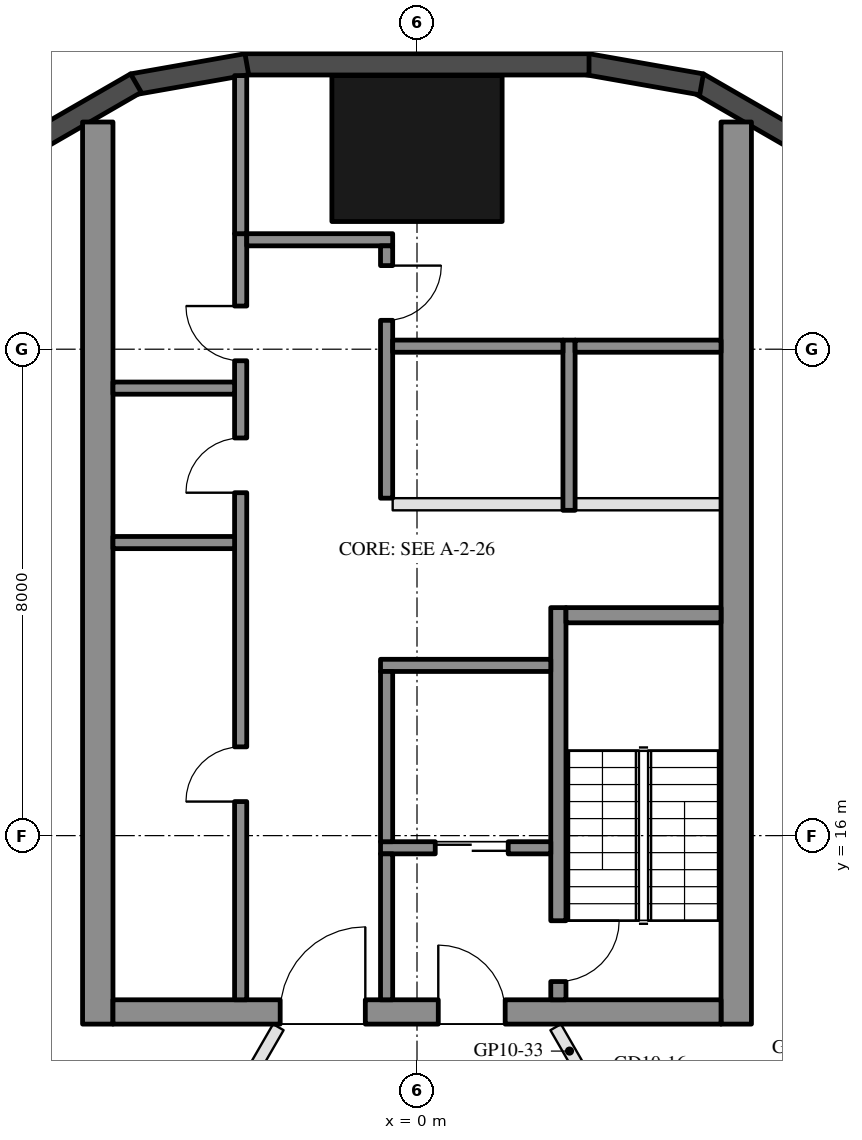
"""IFC4 building model, lengths in metres.
Left out: names, types, materials, properties, quantities, classifications, styles, units other than length and angle.
Written with IfcOpenShell. Run it as: python <this file> out.ifc"""

import sys

from ifc_helpers import new_model, si_unit, direction, frame, frame_2d, origin, origin_2d, place, context, subcontext, project, spatial, rectangle, hollow_rectangle, extrude, element, fill, save


model = new_model("IFC4")
c1 = context("Model", 3, precision=1e-05, world=origin(), true_north=direction((0.0, 1.0)))
c2 = subcontext(c1, "Body", "Model", "MODEL_VIEW")
j1 = project(units=[si_unit("LENGTHUNIT", "METRE"), si_unit("PLANEANGLEUNIT", "RADIAN")], contexts=[c1])
p1 = place(None, origin())
s1 = spatial("IfcSite", under=j1, at=p1, CompositionType="ELEMENT")
p2 = place(p1, origin())
s2 = spatial("IfcBuilding", under=s1, at=p2, CompositionType="ELEMENT")
p3 = place(p2, frame((0.0, 0.0, 116.8)))
s3 = spatial("IfcBuildingStorey", under=s2, at=p3, CompositionType="ELEMENT", Elevation=116.8)
p4 = place(p3, frame((0.0, 27.3, 0.0), z_axis=(0.0, 0.0, 1.0), x_axis=(1.0, 0.0, 0.0)))
e1 = element("IfcColumn", 1, at=p4, inside=s3, PredefinedType="COLUMN", context=c2, shape_type="SweptSolid", body=[
    extrude(hollow_rectangle(XDim=2.8, YDim=2.4, WallThickness=0.07, at=origin_2d()), origin(), (0.0, 0.0, 1.0), 3.7),
])
for number, where, z_axis, x_axis in (
    (2, (6.277, 27.422, 0.0), (0.0, 0.0, 1.0), (-0.866, 0.5, 0.0)),
    (3, (4.68, 28.356, 0.0), (0.0, 0.0, 1.0), (-0.985, 0.174, 0.0)),
):
    element("IfcWall", number, at=place(p3, frame(where, z_axis=z_axis, x_axis=x_axis)), inside=s3, PredefinedType="SOLIDWALL", context=c2, shape_type="SweptSolid", body=[
        extrude(rectangle(XDim=1.91, YDim=0.35, at=frame_2d((0.955, 0.0))), origin(), (0.0, 0.0, 1.0), 3.55),
    ])
p5 = place(p3, frame((2.829, 28.685, 0.0), z_axis=(0.0, 0.0, 1.0), x_axis=(-1.0, 0.0, 0.0)))
e4 = element("IfcWall", 4, at=p5, inside=s3, PredefinedType="SOLIDWALL", context=c2, shape_type="SweptSolid", body=[
    extrude(rectangle(XDim=5.658, YDim=0.35, at=frame_2d((2.829, 0.0))), origin(), (0.0, 0.0, 1.0), 3.55),
])
for number, where, z_axis, x_axis in (
    (5, (-2.799, 28.688, 0.0), (0.0, 0.0, 1.0), (-0.985, -0.174, 0.0)),
    (6, (-4.623, 28.377, 0.0), (0.0, 0.0, 1.0), (-0.866, -0.5, 0.0)),
):
    element("IfcWall", number, at=place(p3, frame(where, z_axis=z_axis, x_axis=x_axis)), inside=s3, PredefinedType="SOLIDWALL", context=c2, shape_type="SweptSolid", body=[
        extrude(rectangle(XDim=1.91, YDim=0.35, at=frame_2d((0.955, 0.0))), origin(), (0.0, 0.0, 1.0), 3.55),
    ])
for number, where, z_axis, x_axis in (
    (7, (5.25, 12.9, 0.0), (0.0, 0.0, 1.0), (0.0, 1.0, 0.0)),
    (8, (-5.25, 12.9, 0.0), (0.0, 0.0, 1.0), (0.0, 1.0, 0.0)),
):
    element("IfcWall", number, at=place(p3, frame(where, z_axis=z_axis, x_axis=x_axis)), inside=s3, PredefinedType="SHEAR", context=c2, shape_type="SweptSolid", body=[
        extrude(rectangle(XDim=14.837, YDim=0.5, at=frame_2d((7.418, 0.0))), origin(), (0.0, 0.0, 1.0), 3.5),
    ])
p6 = place(p3, frame((5.0, 13.1, 0.0), z_axis=(0.0, 0.0, 1.0), x_axis=(-1.0, 0.0, 0.0)))
e9 = element("IfcWall", 9, at=p6, inside=s3, PredefinedType="SHEAR", context=c2, shape_type="SweptSolid", body=[
    extrude(rectangle(XDim=10.0, YDim=0.4, at=frame_2d((5.0, 0.0))), origin(), (0.0, 0.0, 1.0), 3.5),
])
p7 = place(p6, frame((3.55, 0.0, 0.0)))
e10 = element("IfcOpeningElement", 10, at=p7, cuts=e9, PredefinedType="OPENING", context=c2, shape_type="SweptSolid", body=[
    extrude(rectangle(XDim=1.1, YDim=2.1, at=frame_2d((0.55, 1.05))), frame((0.0, 0.21, 0.0), z_axis=(0.0, -1.0, 0.0), x_axis=(1.0, 0.0, 0.0)), (0.0, 0.0, 1.0), 0.42),
])
p8 = place(p6, frame((5.85, 0.0, 0.0)))
e11 = element("IfcOpeningElement", 11, at=p8, cuts=e9, PredefinedType="OPENING", context=c2, shape_type="SweptSolid", body=[
    extrude(rectangle(XDim=1.4, YDim=2.1, at=frame_2d((0.7, 1.05))), frame((0.0, 0.21, 0.0), z_axis=(0.0, -1.0, 0.0), x_axis=(1.0, 0.0, 0.0)), (0.0, 0.0, 1.0), 0.42),
])
p9 = place(p3, frame((2.325, 13.3, 0.0), z_axis=(0.0, 0.0, 1.0), x_axis=(0.0, 1.0, 0.0)))
e12 = element("IfcWall", 12, at=p9, inside=s3, PredefinedType="SHEAR", context=c2, shape_type="SweptSolid", body=[
    extrude(rectangle(XDim=6.45, YDim=0.25, at=frame_2d((3.225, 0.0))), origin(), (0.0, 0.0, 1.0), 3.5),
])
p10 = place(p9, frame((0.3, 0.0, 0.0)))
e13 = element("IfcOpeningElement", 13, at=p10, cuts=e12, PredefinedType="OPENING", context=c2, shape_type="SweptSolid", body=[
    extrude(rectangle(XDim=1.0, YDim=2.1, at=frame_2d((0.5, 1.05))), frame((0.0, 0.135, 0.0), z_axis=(0.0, -1.0, 0.0), x_axis=(1.0, 0.0, 0.0)), (0.0, 0.0, 1.0), 0.27),
])
p11 = place(p3, frame((5.0, 19.625, 0.0), z_axis=(0.0, 0.0, 1.0), x_axis=(-1.0, 0.0, 0.0)))
e14 = element("IfcWall", 14, at=p11, inside=s3, PredefinedType="SHEAR", context=c2, shape_type="SweptSolid", body=[
    extrude(rectangle(XDim=2.55, YDim=0.25, at=frame_2d((1.275, 0.0))), origin(), (0.0, 0.0, 1.0), 3.5),
])
p12 = place(p3, frame((2.2, 18.8, 0.0), z_axis=(0.0, 0.0, 1.0), x_axis=(-1.0, 0.0, 0.0)))
e15 = element("IfcWall", 15, at=p12, inside=s3, PredefinedType="SHEAR", context=c2, shape_type="SweptSolid", body=[
    extrude(rectangle(XDim=2.8, YDim=0.2, at=frame_2d((1.4, 0.0))), origin(), (0.0, 0.0, 1.0), 3.5),
])
p13 = place(p3, frame((2.2, 15.8, 0.0), z_axis=(0.0, 0.0, 1.0), x_axis=(-1.0, 0.0, 0.0)))
e16 = element("IfcWall", 16, at=p13, inside=s3, PredefinedType="SHEAR", context=c2, shape_type="SweptSolid", body=[
    extrude(rectangle(XDim=2.8, YDim=0.2, at=frame_2d((1.4, 0.0))), origin(), (0.0, 0.0, 1.0), 3.5),
])
p14 = place(p13, frame((0.7, 0.0, 0.0)))
e17 = element("IfcOpeningElement", 17, at=p14, cuts=e16, PredefinedType="OPENING", context=c2, shape_type="SweptSolid", body=[
    extrude(rectangle(XDim=1.2, YDim=2.1, at=frame_2d((0.6, 1.05))), frame((0.0, 0.11, 0.0), z_axis=(0.0, -1.0, 0.0), x_axis=(1.0, 0.0, 0.0)), (0.0, 0.0, 1.0), 0.22),
])
p15 = place(p3, frame((-0.5, 15.9, 0.0), z_axis=(0.0, 0.0, 1.0), x_axis=(0.0, 1.0, 0.0)))
e18 = element("IfcWall", 18, at=p15, inside=s3, PredefinedType="SHEAR", context=c2, shape_type="SweptSolid", body=[
    extrude(rectangle(XDim=2.8, YDim=0.2, at=frame_2d((1.4, 0.0))), origin(), (0.0, 0.0, 1.0), 3.5),
])
p16 = place(p3, frame((-0.5, 13.3, 0.0), z_axis=(0.0, 0.0, 1.0), x_axis=(0.0, 1.0, 0.0)))
e19 = element("IfcWall", 19, at=p16, inside=s3, PredefinedType="SHEAR", context=c2, shape_type="SweptSolid", body=[
    extrude(rectangle(XDim=2.4, YDim=0.2, at=frame_2d((1.2, 0.0))), origin(), (0.0, 0.0, 1.0), 3.5),
])
p17 = place(p3, frame((-2.9, 13.3, 0.0), z_axis=(0.0, 0.0, 1.0), x_axis=(0.0, 1.0, 0.0)))
e20 = element("IfcWall", 20, at=p17, inside=s3, PredefinedType="SHEAR", context=c2, shape_type="SweptSolid", body=[
    extrude(rectangle(XDim=12.6, YDim=0.2, at=frame_2d((6.3, 0.0))), origin(), (0.0, 0.0, 1.0), 3.5),
])
p18 = place(p17, frame((3.26, 0.0, 0.0)))
e21 = element("IfcOpeningElement", 21, at=p18, cuts=e20, PredefinedType="OPENING", context=c2, shape_type="SweptSolid", body=[
    extrude(rectangle(XDim=0.9, YDim=2.1, at=frame_2d((0.45, 1.05))), frame((0.0, 0.11, 0.0), z_axis=(0.0, -1.0, 0.0), x_axis=(1.0, 0.0, 0.0)), (0.0, 0.0, 1.0), 0.22),
])
p19 = place(p17, frame((8.34, 0.0, 0.0)))
e22 = element("IfcOpeningElement", 22, at=p19, cuts=e20, PredefinedType="OPENING", context=c2, shape_type="SweptSolid", body=[
    extrude(rectangle(XDim=0.9, YDim=2.1, at=frame_2d((0.45, 1.05))), frame((0.0, 0.11, 0.0), z_axis=(0.0, -1.0, 0.0), x_axis=(1.0, 0.0, 0.0)), (0.0, 0.0, 1.0), 0.22),
])
p20 = place(p17, frame((10.51, 0.0, 0.0)))
e23 = element("IfcOpeningElement", 23, at=p20, cuts=e20, PredefinedType="OPENING", context=c2, shape_type="SweptSolid", body=[
    extrude(rectangle(XDim=0.9, YDim=2.1, at=frame_2d((0.45, 1.05))), frame((0.0, 0.11, 0.0), z_axis=(0.0, -1.0, 0.0), x_axis=(1.0, 0.0, 0.0)), (0.0, 0.0, 1.0), 0.22),
])
p21 = place(p3, frame((-0.4, 25.8, 0.0), z_axis=(0.0, 0.0, 1.0), x_axis=(-1.0, 0.0, 0.0)))
e24 = element("IfcWall", 24, at=p21, inside=s3, PredefinedType="SHEAR", context=c2, shape_type="SweptSolid", body=[
    extrude(rectangle(XDim=2.4, YDim=0.2, at=frame_2d((1.2, 0.0))), origin(), (0.0, 0.0, 1.0), 3.5),
])
p22 = place(p3, frame((-0.5, 21.55, 0.0), z_axis=(0.0, 0.0, 1.0), x_axis=(0.0, 1.0, 0.0)))
e25 = element("IfcWall", 25, at=p22, inside=s3, PredefinedType="SHEAR", context=c2, shape_type="SweptSolid", body=[
    extrude(rectangle(XDim=4.15, YDim=0.2, at=frame_2d((2.075, 0.0))), origin(), (0.0, 0.0, 1.0), 3.5),
])
p23 = place(p22, frame((2.925, 0.0, 0.0)))
e26 = element("IfcOpeningElement", 26, at=p23, cuts=e25, PredefinedType="OPENING", context=c2, shape_type="SweptSolid", body=[
    extrude(rectangle(XDim=0.9, YDim=2.1, at=frame_2d((0.45, 1.05))), frame((0.0, 0.11, 0.0), z_axis=(0.0, -1.0, 0.0), x_axis=(1.0, 0.0, 0.0)), (0.0, 0.0, 1.0), 0.22),
])
for number, where, z_axis, x_axis in (
    (27, (-3.0, 20.82, 0.0), (0.0, 0.0, 1.0), (-1.0, 0.0, 0.0)),
    (28, (-3.0, 23.36, 0.0), (0.0, 0.0, 1.0), (-1.0, 0.0, 0.0)),
):
    element("IfcWall", number, at=place(p3, frame(where, z_axis=z_axis, x_axis=x_axis)), inside=s3, PredefinedType="SHEAR", context=c2, shape_type="SweptSolid", body=[
        extrude(rectangle(XDim=2.0, YDim=0.2, at=frame_2d((1.0, 0.0))), origin(), (0.0, 0.0, 1.0), 3.5),
    ])
p24 = place(p3, frame((-2.9, 25.9, 0.0), z_axis=(0.0, 0.0, 1.0), x_axis=(0.0, 1.0, 0.0)))
e29 = element("IfcWall", 29, at=p24, inside=s3, PredefinedType="SHEAR", context=c2, shape_type="SweptSolid", body=[
    extrude(rectangle(XDim=2.6, YDim=0.2, at=frame_2d((1.3, 0.0))), origin(), (0.0, 0.0, 1.0), 3.5),
])
p25 = place(p3, frame((2.5, 21.35, 0.0), z_axis=(0.0, 0.0, 1.0), x_axis=(0.0, 1.0, 0.0)))
e30 = element("IfcWall", 30, at=p25, inside=s3, PredefinedType="SHEAR", context=c2, shape_type="SweptSolid", body=[
    extrude(rectangle(XDim=2.8, YDim=0.2, at=frame_2d((1.4, 0.0))), origin(), (0.0, 0.0, 1.0), 3.5),
])
p26 = place(p3, frame((5.0, 24.05, 0.0), z_axis=(0.0, 0.0, 1.0), x_axis=(-1.0, 0.0, 0.0)))
e31 = element("IfcWall", 31, at=p26, inside=s3, PredefinedType="SHEAR", context=c2, shape_type="SweptSolid", body=[
    extrude(rectangle(XDim=2.4, YDim=0.2, at=frame_2d((1.2, 0.0))), origin(), (0.0, 0.0, 1.0), 3.5),
])
p27 = place(p3, frame((2.4, 24.05, 0.0), z_axis=(0.0, 0.0, 1.0), x_axis=(-1.0, 0.0, 0.0)))
e32 = element("IfcWall", 32, at=p27, inside=s3, PredefinedType="SHEAR", context=c2, shape_type="SweptSolid", body=[
    extrude(rectangle(XDim=2.8, YDim=0.2, at=frame_2d((1.4, 0.0))), origin(), (0.0, 0.0, 1.0), 3.5),
])
p28 = place(p3, frame((5.0, 21.45, 0.0), z_axis=(0.0, 0.0, 1.0), x_axis=(-1.0, 0.0, 0.0)))
e33 = element("IfcWall", 33, at=p28, inside=s3, PredefinedType="PARTITIONING", context=c2, shape_type="SweptSolid", body=[
    extrude(rectangle(XDim=2.4, YDim=0.2, at=frame_2d((1.2, 0.0))), origin(), (0.0, 0.0, 1.0), 3.5),
])
p29 = place(p3, frame((2.4, 21.45, 0.0), z_axis=(0.0, 0.0, 1.0), x_axis=(-1.0, 0.0, 0.0)))
e34 = element("IfcWall", 34, at=p29, inside=s3, PredefinedType="PARTITIONING", context=c2, shape_type="SweptSolid", body=[
    extrude(rectangle(XDim=2.8, YDim=0.2, at=frame_2d((1.4, 0.0))), origin(), (0.0, 0.0, 1.0), 3.5),
])
p30 = place(p3, frame((13.647, 14.923, 0.0), z_axis=(0.0, 0.0, 1.0), x_axis=(-0.866027479907, -0.499996404033, 0.0)))
e35 = element("IfcWall", 35, at=p30, inside=s3, PredefinedType="PARTITIONING", context=c2, shape_type="SweptSolid", body=[
    extrude(rectangle(XDim=10.98, YDim=0.2, at=frame_2d((5.49, 0.0))), origin(), (0.0, 0.0, 1.0), 2.96),
])
p31 = place(p3, frame((-13.508, 13.363, 0.0), z_axis=(0.0, 0.0, 1.0), x_axis=(0.915297635711, -0.402778149932, 0.0)))
e36 = element("IfcWall", 36, at=p31, inside=s3, PredefinedType="PARTITIONING", context=c2, shape_type="SweptSolid", body=[
    extrude(rectangle(XDim=10.14, YDim=0.2, at=frame_2d((5.07, 0.0))), origin(), (0.0, 0.0, 1.0), 2.96),
])
p32 = place(p3, frame((14.522, 13.407, 0.0), z_axis=(0.0, 0.0, 1.0), x_axis=(-0.851781158383, -0.523897755506, 0.0)))
e37 = element("IfcWall", 37, at=p32, inside=s3, PredefinedType="PARTITIONING", context=c2, shape_type="SweptSolid", body=[
    extrude(rectangle(XDim=10.984, YDim=0.15, at=frame_2d((5.492, 0.0))), origin(), (0.0, 0.0, 1.0), 2.95),
])
p33 = place(p3, frame((2.281, 12.85, 0.0), z_axis=(0.0, 0.0, 1.0), x_axis=(0.499979074716, -0.866037484666, 0.0)))
e38 = element("IfcWall", 38, at=p33, inside=s3, PredefinedType="PARTITIONING", context=c2, shape_type="SweptSolid", body=[
    extrude(rectangle(XDim=3.788, YDim=0.2, at=frame_2d((1.894, 0.0))), origin(), (0.0, 0.0, 1.0), 2.95),
])
p34 = place(p33, frame((1.394, 0.0, 0.0)))
e39 = element("IfcOpeningElement", 39, at=p34, cuts=e38, PredefinedType="OPENING", context=c2, shape_type="SweptSolid", body=[
    extrude(rectangle(XDim=1.0, YDim=2.1, at=frame_2d((0.5, 1.05))), frame((0.0, 0.11, 0.0), z_axis=(0.0, -1.0, 0.0), x_axis=(1.0, 0.0, 0.0)), (0.0, 0.0, 1.0), 0.22),
])
p35 = place(p3, frame((-4.269, 9.406, 0.0), z_axis=(0.0, 0.0, 1.0), x_axis=(0.499968678846, 0.866043486306, 0.0)))
e40 = element("IfcWall", 40, at=p35, inside=s3, PredefinedType="PARTITIONING", context=c2, shape_type="SweptSolid", body=[
    extrude(rectangle(XDim=3.977, YDim=0.2, at=frame_2d((1.988, 0.0))), origin(), (0.0, 0.0, 1.0), 2.95),
])
p36 = place(p35, frame((1.488, 0.0, 0.0)))
e41 = element("IfcOpeningElement", 41, at=p36, cuts=e40, PredefinedType="OPENING", context=c2, shape_type="SweptSolid", body=[
    extrude(rectangle(XDim=1.0, YDim=2.1, at=frame_2d((0.5, 1.05))), frame((0.0, 0.11, 0.0), z_axis=(0.0, -1.0, 0.0), x_axis=(1.0, 0.0, 0.0)), (0.0, 0.0, 1.0), 0.22),
])
p37 = place(p14, origin())
e42 = element("IfcDoor", 42, at=p37, inside=s3, OperationType="DOUBLE_DOOR_SLIDING", PredefinedType="DOOR", context=c2, shape_type="SweptSolid", body=[
    extrude(rectangle(XDim=1.2, YDim=2.1, at=frame_2d((0.6, 1.05))), frame((0.0, 0.025, 0.0), z_axis=(0.0, -1.0, 0.0), x_axis=(1.0, 0.0, 0.0)), (0.0, 0.0, 1.0), 0.05),
])
fill(e17, e42)
p38 = place(p18, origin())
e43 = element("IfcDoor", 43, at=p38, inside=s3, OperationType="SINGLE_SWING_LEFT", PredefinedType="DOOR", context=c2, shape_type="SweptSolid", body=[
    extrude(rectangle(XDim=0.9, YDim=2.1, at=frame_2d((0.45, 1.05))), frame((0.0, 0.025, 0.0), z_axis=(0.0, -1.0, 0.0), x_axis=(1.0, 0.0, 0.0)), (0.0, 0.0, 1.0), 0.05),
])
fill(e21, e43)
p39 = place(p19, origin())
e44 = element("IfcDoor", 44, at=p39, inside=s3, OperationType="SINGLE_SWING_LEFT", PredefinedType="DOOR", context=c2, shape_type="SweptSolid", body=[
    extrude(rectangle(XDim=0.9, YDim=2.1, at=frame_2d((0.45, 1.05))), frame((0.0, 0.025, 0.0), z_axis=(0.0, -1.0, 0.0), x_axis=(1.0, 0.0, 0.0)), (0.0, 0.0, 1.0), 0.05),
])
fill(e22, e44)
p40 = place(p20, origin())
e45 = element("IfcDoor", 45, at=p40, inside=s3, OperationType="SINGLE_SWING_RIGHT", PredefinedType="DOOR", context=c2, shape_type="SweptSolid", body=[
    extrude(rectangle(XDim=0.9, YDim=2.1, at=frame_2d((0.45, 1.05))), frame((0.0, 0.025, 0.0), z_axis=(0.0, -1.0, 0.0), x_axis=(1.0, 0.0, 0.0)), (0.0, 0.0, 1.0), 0.05),
])
fill(e23, e45)
p41 = place(p23, frame((0.9, 0.0, 0.0), z_axis=(0.0, 0.0, 1.0), x_axis=(-1.0, 0.0, 0.0)))
e46 = element("IfcDoor", 46, at=p41, inside=s3, OperationType="SINGLE_SWING_LEFT", PredefinedType="DOOR", context=c2, shape_type="SweptSolid", body=[
    extrude(rectangle(XDim=0.9, YDim=2.1, at=frame_2d((0.45, 1.05))), frame((0.0, 0.025, 0.0), z_axis=(0.0, -1.0, 0.0), x_axis=(1.0, 0.0, 0.0)), (0.0, 0.0, 1.0), 0.05),
])
fill(e26, e46)
p42 = place(p7, frame((1.1, 0.0, 0.0), z_axis=(0.0, 0.0, 1.0), x_axis=(-1.0, 0.0, 0.0)))
e47 = element("IfcDoor", 47, at=p42, inside=s3, OperationType="SINGLE_SWING_LEFT", PredefinedType="DOOR", context=c2, shape_type="SweptSolid", body=[
    extrude(rectangle(XDim=1.1, YDim=2.1, at=frame_2d((0.55, 1.05))), frame((0.0, 0.025, 0.0), z_axis=(0.0, -1.0, 0.0), x_axis=(1.0, 0.0, 0.0)), (0.0, 0.0, 1.0), 0.05),
])
fill(e10, e47)
p43 = place(p8, frame((1.4, 0.0, 0.0), z_axis=(0.0, 0.0, 1.0), x_axis=(-1.0, 0.0, 0.0)))
e48 = element("IfcDoor", 48, at=p43, inside=s3, OperationType="DOUBLE_DOOR_SINGLE_SWING", PredefinedType="DOOR", context=c2, shape_type="SweptSolid", body=[
    extrude(rectangle(XDim=1.4, YDim=2.1, at=frame_2d((0.7, 1.05))), frame((0.0, 0.025, 0.0), z_axis=(0.0, -1.0, 0.0), x_axis=(1.0, 0.0, 0.0)), (0.0, 0.0, 1.0), 0.05),
])
fill(e11, e48)
p44 = place(p10, frame((1.0, 0.0, 0.0), z_axis=(0.0, 0.0, 1.0), x_axis=(-1.0, 0.0, 0.0)))
e49 = element("IfcDoor", 49, at=p44, inside=s3, OperationType="SINGLE_SWING_LEFT", PredefinedType="DOOR", context=c2, shape_type="SweptSolid", body=[
    extrude(rectangle(XDim=1.0, YDim=2.1, at=frame_2d((0.5, 1.05))), frame((0.0, 0.025, 0.0), z_axis=(0.0, -1.0, 0.0), x_axis=(1.0, 0.0, 0.0)), (0.0, 0.0, 1.0), 0.05),
])
fill(e13, e49)
save(model, sys.argv[1])
